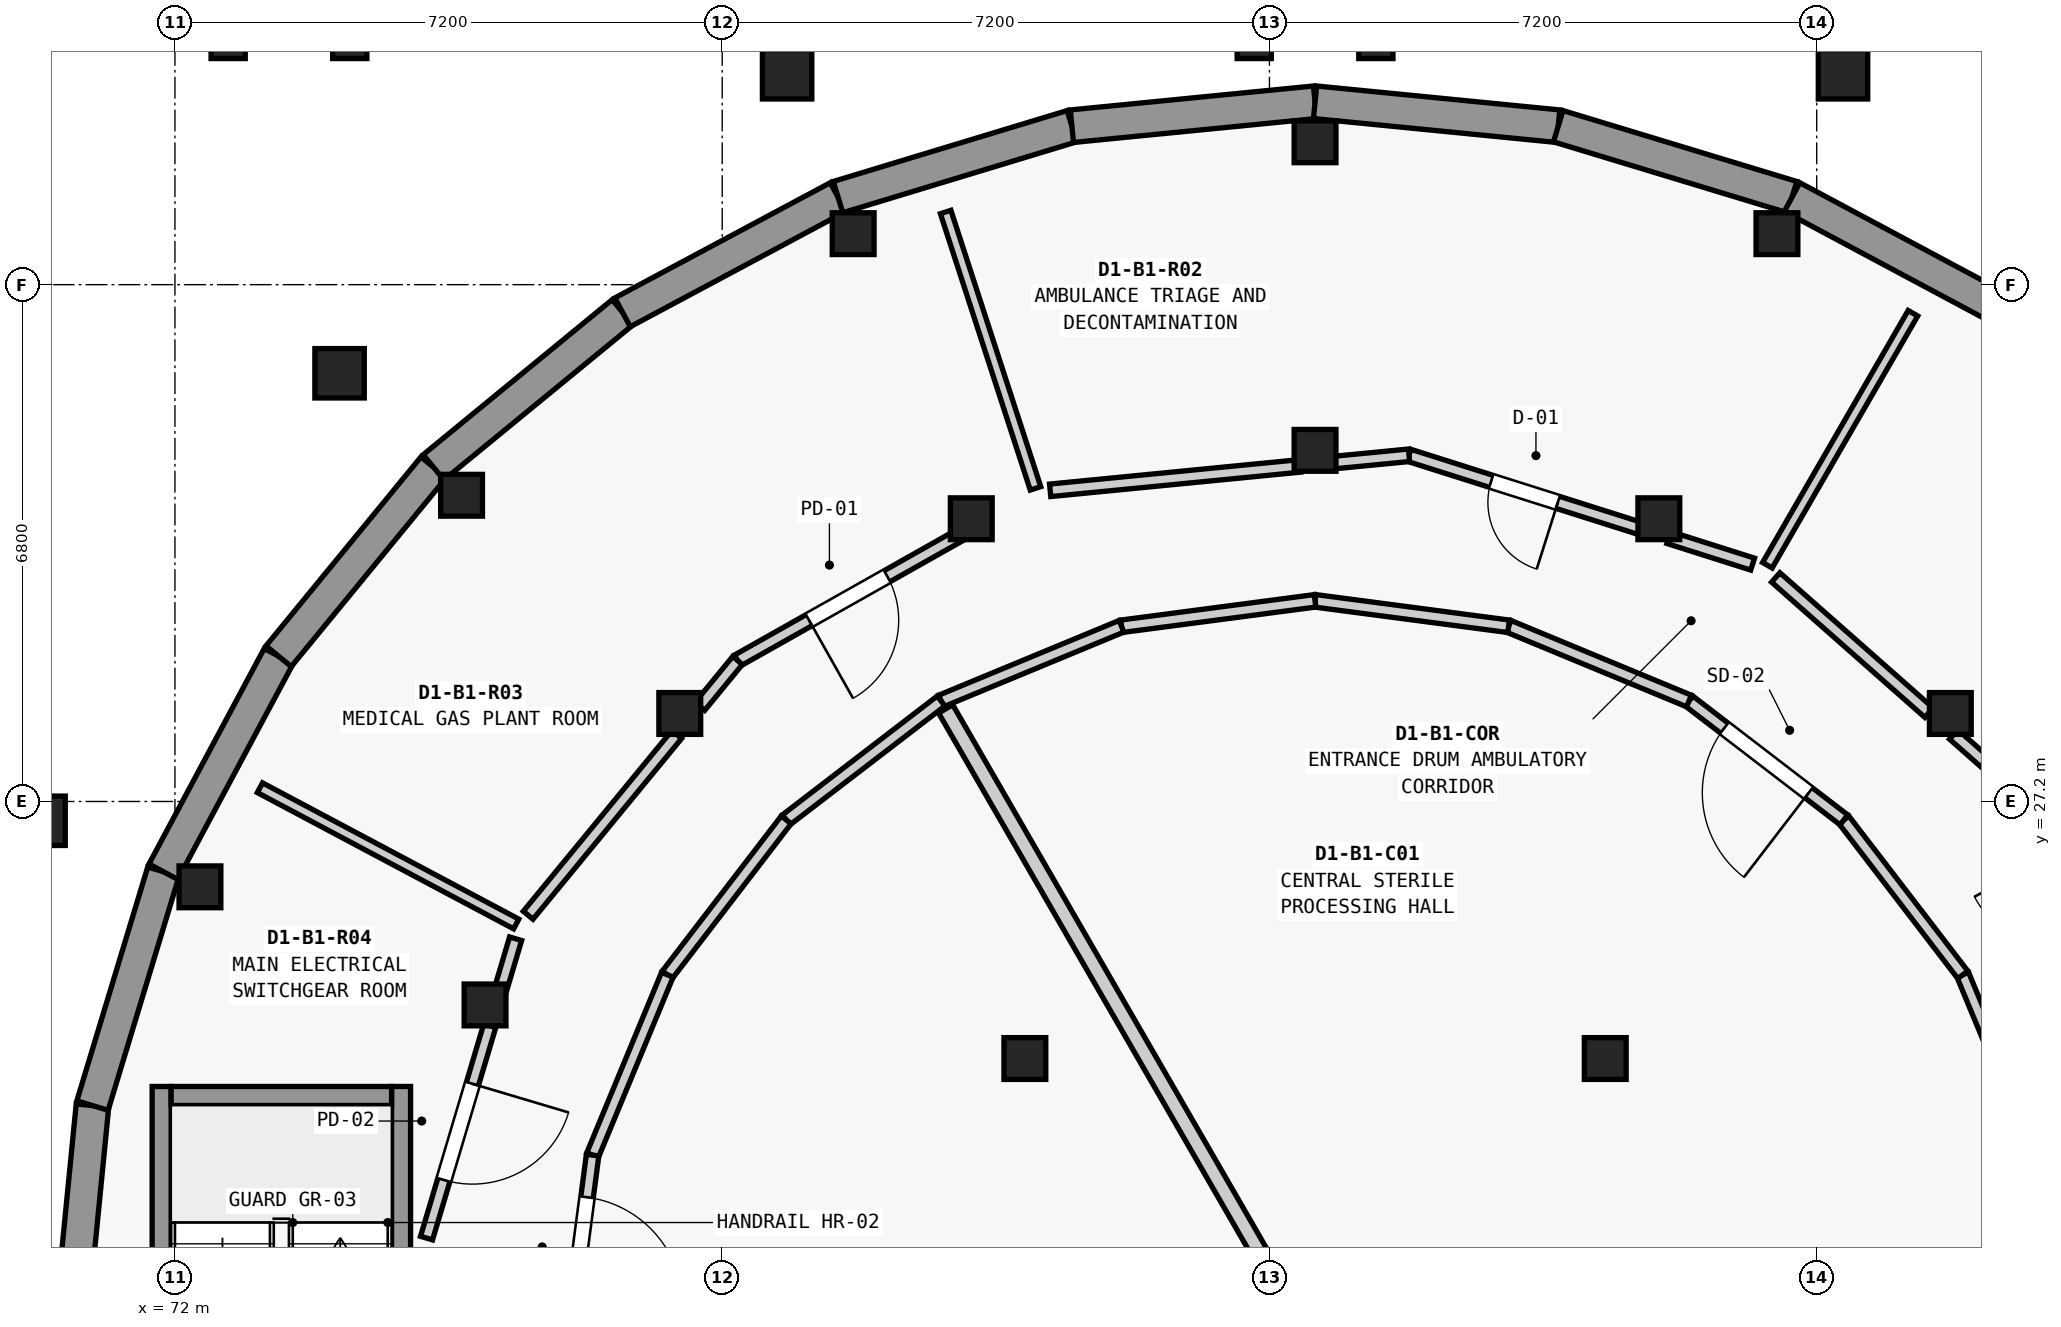
"""IFC4 building model, lengths in metres.
Left out: names, types, materials, properties, quantities, classifications, styles, units other than length and angle.
Written with IfcOpenShell. Run it as: python <this file> out.ifc"""

import sys

from ifc_helpers import new_model, si_unit, direction, frame, frame_2d, origin, origin_2d, place, context, subcontext, project, spatial, rectangle, extrude, element, fill, save


model = new_model("IFC4")
c1 = context("Model", 3, precision=1e-05, world=origin(), true_north=direction((0.0, 1.0)))
c2 = subcontext(c1, "Body", "Model", "MODEL_VIEW")
j1 = project(units=[si_unit("LENGTHUNIT", "METRE"), si_unit("PLANEANGLEUNIT", "RADIAN")], contexts=[c1])
p1 = place(None, origin())
s1 = spatial("IfcSite", under=j1, at=p1, CompositionType="ELEMENT")
p2 = place(p1, origin())
s2 = spatial("IfcBuilding", under=s1, at=p2, CompositionType="ELEMENT")
p3 = place(p2, frame((0.0, 0.0, -4.55)))
s3 = spatial("IfcBuildingStorey", under=s2, at=p3, CompositionType="ELEMENT", Elevation=-4.55)
for number, where, z_axis, x_axis in (
    (1, (93.077, 34.671, 0.0), (0.0, 0.0, 1.0), (1.0, 0.0, 0.0)),
    (2, (87.0, 35.88, 0.0), (0.0, 0.0, 1.0), (1.0, 0.0, 0.0)),
    (3, (80.923, 34.671, 0.0), (0.0, 0.0, 1.0), (1.0, 0.0, 0.0)),
    (4, (75.771, 31.229, 0.0), (0.0, 0.0, 1.0), (1.0, 0.0, 0.0)),
    (5, (72.329, 26.077, 0.0), (0.0, 0.0, 1.0), (1.0, 0.0, 0.0)),
    (6, (95.358, 28.358, 0.0), (0.0, 0.0, 1.0), (1.0, 0.0, 0.0)),
    (7, (91.523, 30.92, 0.0), (0.0, 0.0, 1.0), (1.0, 0.0, 0.0)),
    (8, (87.0, 31.82, 0.0), (0.0, 0.0, 1.0), (1.0, 0.0, 0.0)),
    (9, (82.477, 30.92, 0.0), (0.0, 0.0, 1.0), (1.0, 0.0, 0.0)),
    (10, (78.642, 28.358, 0.0), (0.0, 0.0, 1.0), (1.0, 0.0, 0.0)),
    (11, (76.08, 24.523, 0.0), (0.0, 0.0, 1.0), (1.0, 0.0, 0.0)),
    (12, (90.818, 23.818, 0.0), (0.0, 0.0, 1.0), (1.0, 0.0, 0.0)),
    (13, (83.182, 23.818, 0.0), (0.0, 0.0, 1.0), (1.0, 0.0, 0.0)),
):
    element("IfcColumn", number, at=place(p3, frame(where, z_axis=z_axis, x_axis=x_axis)), inside=s3, PredefinedType="COLUMN", context=c2, shape_type="SweptSolid", body=[
        extrude(rectangle(XDim=0.55, YDim=0.55, at=origin_2d()), origin(), (0.0, 0.0, 1.0), 4.55),
    ])
for number, where, z_axis, x_axis in (
    (14, (93.946, 36.768, 0.0), (0.0, 0.0, 1.0), (1.0, 0.0, 0.0)),
    (15, (80.054, 36.768, 0.0), (0.0, 0.0, 1.0), (1.0, 0.0, 0.0)),
    (16, (74.166, 32.834, 0.0), (0.0, 0.0, 1.0), (1.0, 0.0, 0.0)),
    (17, (70.232, 26.946, 0.0), (0.0, 0.0, 1.0), (1.0, 0.0, 0.0)),
):
    element("IfcColumn", number, at=place(p3, frame(where, z_axis=z_axis, x_axis=x_axis)), inside=s3, PredefinedType="COLUMN", context=c2, shape_type="SweptSolid", body=[
        extrude(rectangle(XDim=0.65, YDim=0.65, at=origin_2d()), origin(), (0.0, 0.0, 1.0), 4.55),
    ])
for number, where, z_axis, x_axis in (
    (18, (72.7, 37.2, 0.0), (0.0, 0.0, 1.0), (1.0, 0.0, 0.0)),
    (19, (74.3, 37.2, 0.0), (0.0, 0.0, 1.0), (1.0, 0.0, 0.0)),
    (20, (86.2, 37.2, 0.0), (0.0, 0.0, 1.0), (1.0, 0.0, 0.0)),
    (21, (87.8, 37.2, 0.0), (0.0, 0.0, 1.0), (1.0, 0.0, 0.0)),
):
    element("IfcColumn", number, at=place(p3, frame(where, z_axis=z_axis, x_axis=x_axis)), inside=s3, PredefinedType="COLUMN", context=c2, shape_type="SweptSolid", body=[
        extrude(rectangle(XDim=0.45, YDim=0.45, at=origin_2d()), origin(), (0.0, 0.0, 1.0), 5.48),
    ])
p4 = place(p3, frame((70.6, 20.0, 0.0), z_axis=(0.0, 0.0, 1.0), x_axis=(0.097977057849, 0.995188673637, 0.0)))
e22 = element("IfcWall", 22, at=p4, inside=s3, PredefinedType="USERDEFINED", context=c2, shape_type="SweptSolid", body=[
    extrude(rectangle(XDim=3.214, YDim=0.43, at=frame_2d((1.607, 0.0))), origin(), (0.0, 0.0, 1.0), 3.335),
])
for number, where, z_axis, x_axis in (
    (23, (70.915, 23.199, 0.0), (0.0, 0.0, 1.0), (0.29, 0.957, 0.0)),
    (24, (71.848, 26.276, 0.0), (0.0, 0.0, 1.0), (0.472, 0.882, 0.0)),
    (25, (73.364, 29.111, 0.0), (0.0, 0.0, 1.0), (0.634, 0.773, 0.0)),
    (26, (75.403, 31.597, 0.0), (0.0, 0.0, 1.0), (0.773, 0.634, 0.0)),
    (27, (77.889, 33.636, 0.0), (0.0, 0.0, 1.0), (0.882, 0.472, 0.0)),
    (28, (80.724, 35.152, 0.0), (0.0, 0.0, 1.0), (0.957, 0.29, 0.0)),
):
    element("IfcWall", number, at=place(p3, frame(where, z_axis=z_axis, x_axis=x_axis)), inside=s3, PredefinedType="USERDEFINED", context=c2, shape_type="SweptSolid", body=[
        extrude(rectangle(XDim=3.215, YDim=0.43, at=frame_2d((1.607, 0.0))), origin(), (0.0, 0.0, 1.0), 3.335),
    ])
for number, where, z_axis, x_axis in (
    (29, (83.801, 36.085, 0.0), (0.0, 0.0, 1.0), (0.995, 0.098, 0.0)),
    (30, (87.0, 36.4, 0.0), (0.0, 0.0, 1.0), (0.995, -0.098, 0.0)),
):
    element("IfcWall", number, at=place(p3, frame(where, z_axis=z_axis, x_axis=x_axis)), inside=s3, PredefinedType="USERDEFINED", context=c2, shape_type="SweptSolid", body=[
        extrude(rectangle(XDim=3.214, YDim=0.43, at=frame_2d((1.607, 0.0))), origin(), (0.0, 0.0, 1.0), 3.335),
    ])
for number, where, z_axis, x_axis in (
    (31, (90.199, 36.085, 0.0), (0.0, 0.0, 1.0), (0.957, -0.29, 0.0)),
    (32, (93.276, 35.152, 0.0), (0.0, 0.0, 1.0), (0.882, -0.472, 0.0)),
):
    element("IfcWall", number, at=place(p3, frame(where, z_axis=z_axis, x_axis=x_axis)), inside=s3, PredefinedType="USERDEFINED", context=c2, shape_type="SweptSolid", body=[
        extrude(rectangle(XDim=3.215, YDim=0.43, at=frame_2d((1.607, 0.0))), origin(), (0.0, 0.0, 1.0), 3.335),
    ])
p5 = place(p3, frame((74.975, 16.55, 0.0), z_axis=(0.0, 0.0, 1.0), x_axis=(0.0, 1.0, 0.0)))
e33 = element("IfcWall", 33, at=p5, inside=s3, PredefinedType="SHEAR", context=c2, shape_type="SweptSolid", body=[
    extrude(rectangle(XDim=6.9, YDim=0.25, at=frame_2d((3.45, 0.0))), origin(), (0.0, 0.0, 1.0), 4.135),
])
p6 = place(p5, frame((0.43, 0.0, 0.0)))
e34 = element("IfcOpeningElement", 34, at=p6, cuts=e33, PredefinedType="OPENING", context=c2, shape_type="SweptSolid", body=[
    extrude(rectangle(XDim=1.1, YDim=2.15, at=frame_2d((0.55, 1.075))), frame((0.0, 0.135, 0.0), z_axis=(0.0, -1.0, 0.0), x_axis=(1.0, 0.0, 0.0)), (0.0, 0.0, 1.0), 0.27),
])
p7 = place(p3, frame((71.825, 16.55, 0.0), z_axis=(0.0, 0.0, 1.0), x_axis=(0.0, 1.0, 0.0)))
e35 = element("IfcWall", 35, at=p7, inside=s3, PredefinedType="SHEAR", context=c2, shape_type="SweptSolid", body=[
    extrude(rectangle(XDim=6.9, YDim=0.25, at=frame_2d((3.45, 0.0))), origin(), (0.0, 0.0, 1.0), 4.135),
])
p8 = place(p3, frame((74.85, 23.325, 0.0), z_axis=(0.0, 0.0, 1.0), x_axis=(-1.0, 0.0, 0.0)))
e36 = element("IfcWall", 36, at=p8, inside=s3, PredefinedType="SHEAR", context=c2, shape_type="SweptSolid", body=[
    extrude(rectangle(XDim=2.9, YDim=0.25, at=frame_2d((1.45, 0.0))), origin(), (0.0, 0.0, 1.0), 4.135),
])
p9 = place(p3, frame((86.55, 20.779, 0.0), z_axis=(0.0, 0.0, 1.0), x_axis=(-0.499985207697, 0.866033943956, 0.0)))
e37 = element("IfcWall", 37, at=p9, inside=s3, PredefinedType="SOLIDWALL", context=c2, shape_type="SweptSolid", body=[
    extrude(rectangle(XDim=8.821, YDim=0.215, at=frame_2d((4.41, 0.0))), origin(), (0.0, 0.0, 1.0), 2.76),
])
p10 = place(p3, frame((96.505, 22.547, 0.0), z_axis=(0.0, 0.0, 1.0), x_axis=(-0.382704397106, 0.923870848353, 0.0)))
e38 = element("IfcWall", 38, at=p10, inside=s3, PredefinedType="PARTITIONING", context=c2, shape_type="SweptSolid", body=[
    extrude(rectangle(XDim=2.568, YDim=0.165, at=frame_2d((1.284, 0.0))), origin(), (0.0, 0.0, 1.0), 2.76),
])
p11 = place(p3, frame((95.522, 24.92, 0.0), z_axis=(0.0, 0.0, 1.0), x_axis=(-0.608782621434, 0.793337078322, 0.0)))
e39 = element("IfcWall", 39, at=p11, inside=s3, PredefinedType="PARTITIONING", context=c2, shape_type="SweptSolid", body=[
    extrude(rectangle(XDim=2.569, YDim=0.165, at=frame_2d((1.285, 0.0))), origin(), (0.0, 0.0, 1.0), 2.76),
])
p12 = place(p3, frame((93.958, 26.958, 0.0), z_axis=(0.0, 0.0, 1.0), x_axis=(-0.793337078322, 0.608782621434, 0.0)))
e40 = element("IfcWall", 40, at=p12, inside=s3, PredefinedType="PARTITIONING", context=c2, shape_type="SweptSolid", body=[
    extrude(rectangle(XDim=2.569, YDim=0.165, at=frame_2d((1.285, 0.0))), origin(), (0.0, 0.0, 1.0), 2.76),
])
p13 = place(p12, frame((0.584, 0.0, 0.0)))
e41 = element("IfcOpeningElement", 41, at=p13, cuts=e40, PredefinedType="OPENING", context=c2, shape_type="SweptSolid", body=[
    extrude(rectangle(XDim=1.4, YDim=2.25, at=frame_2d((0.7, 1.125))), frame((0.0, 0.093, 0.0), z_axis=(0.0, -1.0, 0.0), x_axis=(1.0, 0.0, 0.0)), (0.0, 0.0, 1.0), 0.185),
])
p14 = place(p3, frame((91.92, 28.522, 0.0), z_axis=(0.0, 0.0, 1.0), x_axis=(-0.923870848353, 0.382704397106, 0.0)))
e42 = element("IfcWall", 42, at=p14, inside=s3, PredefinedType="PARTITIONING", context=c2, shape_type="SweptSolid", body=[
    extrude(rectangle(XDim=2.568, YDim=0.165, at=frame_2d((1.284, 0.0))), origin(), (0.0, 0.0, 1.0), 2.76),
])
for number, where, z_axis, x_axis in (
    (43, (89.547, 29.505, 0.0), (0.0, 0.0, 1.0), (-0.991, 0.13, 0.0)),
    (44, (87.0, 29.84, 0.0), (0.0, 0.0, 1.0), (-0.991, -0.13, 0.0)),
):
    element("IfcWall", number, at=place(p3, frame(where, z_axis=z_axis, x_axis=x_axis)), inside=s3, PredefinedType="PARTITIONING", context=c2, shape_type="SweptSolid", body=[
        extrude(rectangle(XDim=2.569, YDim=0.165, at=frame_2d((1.285, 0.0))), origin(), (0.0, 0.0, 1.0), 2.76),
    ])
p15 = place(p3, frame((84.453, 29.505, 0.0), z_axis=(0.0, 0.0, 1.0), x_axis=(-0.923870848353, -0.382704397106, 0.0)))
e45 = element("IfcWall", 45, at=p15, inside=s3, PredefinedType="PARTITIONING", context=c2, shape_type="SweptSolid", body=[
    extrude(rectangle(XDim=2.568, YDim=0.165, at=frame_2d((1.284, 0.0))), origin(), (0.0, 0.0, 1.0), 2.76),
])
for number, where, z_axis, x_axis in (
    (46, (82.08, 28.522, 0.0), (0.0, 0.0, 1.0), (-0.793, -0.609, 0.0)),
    (47, (80.042, 26.958, 0.0), (0.0, 0.0, 1.0), (-0.609, -0.793, 0.0)),
):
    element("IfcWall", number, at=place(p3, frame(where, z_axis=z_axis, x_axis=x_axis)), inside=s3, PredefinedType="PARTITIONING", context=c2, shape_type="SweptSolid", body=[
        extrude(rectangle(XDim=2.569, YDim=0.165, at=frame_2d((1.285, 0.0))), origin(), (0.0, 0.0, 1.0), 2.76),
    ])
p16 = place(p3, frame((78.478, 24.92, 0.0), z_axis=(0.0, 0.0, 1.0), x_axis=(-0.382704397106, -0.923870848353, 0.0)))
e48 = element("IfcWall", 48, at=p16, inside=s3, PredefinedType="PARTITIONING", context=c2, shape_type="SweptSolid", body=[
    extrude(rectangle(XDim=2.568, YDim=0.165, at=frame_2d((1.284, 0.0))), origin(), (0.0, 0.0, 1.0), 2.76),
])
p17 = place(p3, frame((77.495, 22.547, 0.0), z_axis=(0.0, 0.0, 1.0), x_axis=(-0.130476636685, -0.991451384224, 0.0)))
e49 = element("IfcWall", 49, at=p17, inside=s3, PredefinedType="PARTITIONING", context=c2, shape_type="SweptSolid", body=[
    extrude(rectangle(XDim=2.569, YDim=0.165, at=frame_2d((1.285, 0.0))), origin(), (0.0, 0.0, 1.0), 2.76),
])
p18 = place(p17, frame((0.559, 0.0, 0.0)))
e50 = element("IfcOpeningElement", 50, at=p18, cuts=e49, PredefinedType="OPENING", context=c2, shape_type="SweptSolid", body=[
    extrude(rectangle(XDim=1.45, YDim=2.28, at=frame_2d((0.725, 1.14))), frame((0.0, 0.093, 0.0), z_axis=(0.0, -1.0, 0.0), x_axis=(1.0, 0.0, 0.0)), (0.0, 0.0, 1.0), 0.185),
])
p19 = place(p3, frame((92.951, 30.308, 0.0), z_axis=(0.0, 0.0, 1.0), x_axis=(0.500116129234, 0.865958346157, 0.0)))
e51 = element("IfcWall", 51, at=p19, inside=s3, PredefinedType="PARTITIONING", context=c2, shape_type="SweptSolid", body=[
    extrude(rectangle(XDim=3.829, YDim=0.145, at=frame_2d((1.915, 0.0))), origin(), (0.0, 0.0, 1.0), 2.76),
])
p20 = place(p3, frame((83.322, 31.32, 0.0), z_axis=(0.0, 0.0, 1.0), x_axis=(-0.309188585957, 0.951000745696, 0.0)))
e52 = element("IfcWall", 52, at=p20, inside=s3, PredefinedType="PARTITIONING", context=c2, shape_type="SweptSolid", body=[
    extrude(rectangle(XDim=3.823, YDim=0.145, at=frame_2d((1.912, 0.0))), origin(), (0.0, 0.0, 1.0), 2.76),
])
p21 = place(p3, frame((76.49, 25.588, 0.0), z_axis=(0.0, 0.0, 1.0), x_axis=(-0.882920316433, 0.469522858688, 0.0)))
e53 = element("IfcWall", 53, at=p21, inside=s3, PredefinedType="PARTITIONING", context=c2, shape_type="SweptSolid", body=[
    extrude(rectangle(XDim=3.819, YDim=0.145, at=frame_2d((1.91, 0.0))), origin(), (0.0, 0.0, 1.0), 2.76),
])
p22 = place(p3, frame((96.314, 27.277, 0.0), z_axis=(0.0, 0.0, 1.0), x_axis=(-0.749697254826, 0.661780950244, 0.0)))
e54 = element("IfcWall", 54, at=p22, inside=s3, PredefinedType="PARTITIONING", context=c2, shape_type="SweptSolid", body=[
    extrude(rectangle(XDim=1.216, YDim=0.165, at=frame_2d((0.608, 0.0))), origin(), (0.0, 0.0, 1.0), 2.76),
])
p23 = place(p3, frame((95.078, 28.368, 0.0), z_axis=(0.0, 0.0, 1.0), x_axis=(-0.749753094518, 0.661717686979, 0.0)))
e55 = element("IfcWall", 55, at=p23, inside=s3, PredefinedType="PARTITIONING", context=c2, shape_type="SweptSolid", body=[
    extrude(rectangle(XDim=2.69, YDim=0.165, at=frame_2d((1.345, 0.0))), origin(), (0.0, 0.0, 1.0), 2.76),
])
p24 = place(p3, frame((92.757, 30.323, 0.0), z_axis=(0.0, 0.0, 1.0), x_axis=(-0.95314164885, 0.302524374602, 0.0)))
e56 = element("IfcWall", 56, at=p24, inside=s3, PredefinedType="PARTITIONING", context=c2, shape_type="SweptSolid", body=[
    extrude(rectangle(XDim=1.157, YDim=0.165, at=frame_2d((0.579, 0.0))), origin(), (0.0, 0.0, 1.0), 2.76),
])
p25 = place(p3, frame((91.274, 30.793, 0.0), z_axis=(0.0, 0.0, 1.0), x_axis=(-0.953348472905, 0.301871974865, 0.0)))
e57 = element("IfcWall", 57, at=p25, inside=s3, PredefinedType="PARTITIONING", context=c2, shape_type="SweptSolid", body=[
    extrude(rectangle(XDim=3.187, YDim=0.165, at=frame_2d((1.593, 0.0))), origin(), (0.0, 0.0, 1.0), 2.76),
])
p26 = place(p25, frame((1.133, 0.0, 0.0)))
e58 = element("IfcOpeningElement", 58, at=p26, cuts=e57, PredefinedType="OPENING", context=c2, shape_type="SweptSolid", body=[
    extrude(rectangle(XDim=0.92, YDim=2.12, at=frame_2d((0.46, 1.06))), frame((0.0, 0.093, 0.0), z_axis=(0.0, -1.0, 0.0), x_axis=(1.0, 0.0, 0.0)), (0.0, 0.0, 1.0), 0.185),
])
p27 = place(p3, frame((88.236, 31.755, 0.0), z_axis=(0.0, 0.0, 1.0), x_axis=(-0.995326148944, -0.096570478037, 0.0)))
e59 = element("IfcWall", 59, at=p27, inside=s3, PredefinedType="PARTITIONING", context=c2, shape_type="SweptSolid", body=[
    extrude(rectangle(XDim=1.014, YDim=0.165, at=frame_2d((0.507, 0.0))), origin(), (0.0, 0.0, 1.0), 2.76),
])
p28 = place(p3, frame((86.809, 31.616, 0.0), z_axis=(0.0, 0.0, 1.0), x_axis=(-0.995256012435, -0.09729064555, 0.0)))
e60 = element("IfcWall", 60, at=p28, inside=s3, PredefinedType="PARTITIONING", context=c2, shape_type="SweptSolid", body=[
    extrude(rectangle(XDim=3.31, YDim=0.165, at=frame_2d((1.655, 0.0))), origin(), (0.0, 0.0, 1.0), 2.76),
])
p29 = place(p3, frame((82.311, 30.695, 0.0), z_axis=(0.0, 0.0, 1.0), x_axis=(-0.871081128007, -0.491139153836, 0.0)))
e61 = element("IfcWall", 61, at=p29, inside=s3, PredefinedType="PARTITIONING", context=c2, shape_type="SweptSolid", body=[
    extrude(rectangle(XDim=3.339, YDim=0.165, at=frame_2d((1.67, 0.0))), origin(), (0.0, 0.0, 1.0), 2.76),
])
p30 = place(p29, frame((1.08, 0.0, 0.0)))
e62 = element("IfcOpeningElement", 62, at=p30, cuts=e61, PredefinedType="OPENING", context=c2, shape_type="SweptSolid", body=[
    extrude(rectangle(XDim=1.18, YDim=2.2, at=frame_2d((0.59, 1.1))), frame((0.0, 0.093, 0.0), z_axis=(0.0, -1.0, 0.0), x_axis=(1.0, 0.0, 0.0)), (0.0, 0.0, 1.0), 0.185),
])
p31 = place(p3, frame((79.402, 29.055, 0.0), z_axis=(0.0, 0.0, 1.0), x_axis=(-0.634699456668, -0.772759082577, 0.0)))
e63 = element("IfcWall", 63, at=p31, inside=s3, PredefinedType="PARTITIONING", context=c2, shape_type="SweptSolid", body=[
    extrude(rectangle(XDim=0.782, YDim=0.165, at=frame_2d((0.391, 0.0))), origin(), (0.0, 0.0, 1.0), 2.76),
])
p32 = place(p3, frame((78.602, 28.081, 0.0), z_axis=(0.0, 0.0, 1.0), x_axis=(-0.635045466024, -0.772474760806, 0.0)))
e64 = element("IfcWall", 64, at=p32, inside=s3, PredefinedType="PARTITIONING", context=c2, shape_type="SweptSolid", body=[
    extrude(rectangle(XDim=3.079, YDim=0.165, at=frame_2d((1.539, 0.0))), origin(), (0.0, 0.0, 1.0), 2.76),
])
p33 = place(p3, frame((76.482, 25.394, 0.0), z_axis=(0.0, 0.0, 1.0), x_axis=(-0.284901497141, -0.958556799009, 0.0)))
e65 = element("IfcWall", 65, at=p33, inside=s3, PredefinedType="PARTITIONING", context=c2, shape_type="SweptSolid", body=[
    extrude(rectangle(XDim=0.705, YDim=0.165, at=frame_2d((0.353, 0.0))), origin(), (0.0, 0.0, 1.0), 2.76),
])
p34 = place(p3, frame((76.142, 24.25, 0.0), z_axis=(0.0, 0.0, 1.0), x_axis=(-0.285319515422, -0.958432456733, 0.0)))
e66 = element("IfcWall", 66, at=p34, inside=s3, PredefinedType="PARTITIONING", context=c2, shape_type="SweptSolid", body=[
    extrude(rectangle(XDim=2.916, YDim=0.165, at=frame_2d((1.458, 0.0))), origin(), (0.0, 0.0, 1.0), 2.76),
])
p35 = place(p34, frame((0.798, 0.0, 0.0)))
e67 = element("IfcOpeningElement", 67, at=p35, cuts=e66, PredefinedType="OPENING", context=c2, shape_type="SweptSolid", body=[
    extrude(rectangle(XDim=1.32, YDim=2.24, at=frame_2d((0.66, 1.12))), frame((0.0, 0.093, 0.0), z_axis=(0.0, -1.0, 0.0), x_axis=(1.0, 0.0, 0.0)), (0.0, 0.0, 1.0), 0.185),
])
p36 = place(p13, origin())
e68 = element("IfcDoor", 68, at=p36, inside=s3, OperationType="SINGLE_SWING_LEFT", PredefinedType="DOOR", context=c2, shape_type="SweptSolid", body=[
    extrude(rectangle(XDim=1.4, YDim=2.25, at=frame_2d((0.7, 1.125))), frame((0.0, 0.025, 0.0), z_axis=(0.0, -1.0, 0.0), x_axis=(1.0, 0.0, 0.0)), (0.0, 0.0, 1.0), 0.05),
])
fill(e41, e68)
p37 = place(p18, origin())
e69 = element("IfcDoor", 69, at=p37, inside=s3, OperationType="SINGLE_SWING_RIGHT", PredefinedType="DOOR", context=c2, shape_type="SweptSolid", body=[
    extrude(rectangle(XDim=1.45, YDim=2.28, at=frame_2d((0.725, 1.14))), frame((0.0, 0.025, 0.0), z_axis=(0.0, -1.0, 0.0), x_axis=(1.0, 0.0, 0.0)), (0.0, 0.0, 1.0), 0.05),
])
fill(e50, e69)
p38 = place(p26, origin())
e70 = element("IfcDoor", 70, at=p38, inside=s3, OperationType="SINGLE_SWING_LEFT", PredefinedType="DOOR", context=c2, shape_type="SweptSolid", body=[
    extrude(rectangle(XDim=0.92, YDim=2.12, at=frame_2d((0.46, 1.06))), frame((0.0, 0.025, 0.0), z_axis=(0.0, -1.0, 0.0), x_axis=(1.0, 0.0, 0.0)), (0.0, 0.0, 1.0), 0.05),
])
fill(e58, e70)
p39 = place(p30, origin())
e71 = element("IfcDoor", 71, at=p39, inside=s3, OperationType="SINGLE_SWING_RIGHT", PredefinedType="DOOR", context=c2, shape_type="SweptSolid", body=[
    extrude(rectangle(XDim=1.18, YDim=2.2, at=frame_2d((0.59, 1.1))), frame((0.0, 0.025, 0.0), z_axis=(0.0, -1.0, 0.0), x_axis=(1.0, 0.0, 0.0)), (0.0, 0.0, 1.0), 0.05),
])
fill(e62, e71)
p40 = place(p35, origin())
e72 = element("IfcDoor", 72, at=p40, inside=s3, OperationType="SINGLE_SWING_LEFT", PredefinedType="DOOR", context=c2, shape_type="SweptSolid", body=[
    extrude(rectangle(XDim=1.32, YDim=2.24, at=frame_2d((0.66, 1.12))), frame((0.0, 0.025, 0.0), z_axis=(0.0, -1.0, 0.0), x_axis=(1.0, 0.0, 0.0)), (0.0, 0.0, 1.0), 0.05),
])
fill(e67, e72)
save(model, sys.argv[1])
